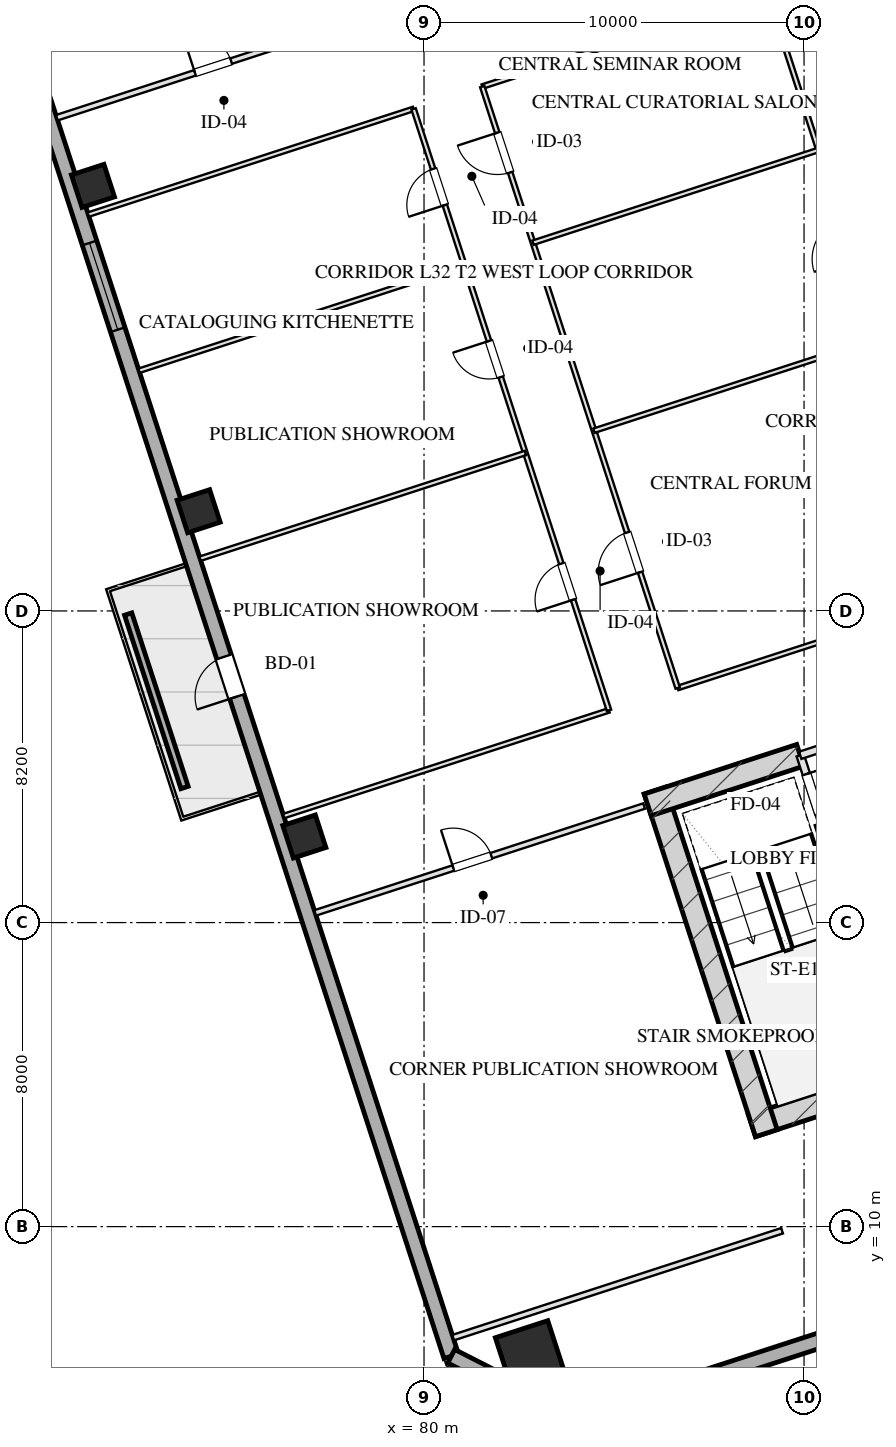
"""IFC4 building model, lengths in metres.
Left out: names, types, materials, properties, quantities, classifications, styles, units other than length and angle.
Written with IfcOpenShell. Run it as: python <this file> out.ifc"""

import sys

from ifc_helpers import new_model, si_unit, direction, frame, frame_2d, origin, origin_2d, place, context, subcontext, project, spatial, rectangle, hollow_rectangle, extrude, element, fill, save


model = new_model("IFC4")
c1 = context("Model", 3, precision=1e-05, world=origin(), true_north=direction((0.0, 1.0)))
c2 = subcontext(c1, "Body", "Model", "MODEL_VIEW")
j1 = project(units=[si_unit("LENGTHUNIT", "METRE"), si_unit("PLANEANGLEUNIT", "RADIAN")], contexts=[c1])
p1 = place(None, origin())
s1 = spatial("IfcSite", under=j1, at=p1, CompositionType="ELEMENT")
p2 = place(p1, origin())
s2 = spatial("IfcBuilding", under=s1, at=p2, CompositionType="ELEMENT")
p3 = place(p2, frame((0.0, 0.0, 124.2)))
s3 = spatial("IfcBuildingStorey", under=s2, at=p3, CompositionType="ELEMENT", Elevation=124.2)
p4 = place(p3, frame((88.63, 12.652, 0.0), z_axis=(0.0, 0.0, 1.0), x_axis=(0.95105714907, 0.309015046886, 0.0)))
e1 = element("IfcWall", 1, at=p4, inside=s3, PredefinedType="SHEAR", context=c2, shape_type="SweptSolid", body=[
    extrude(rectangle(XDim=16.4, YDim=0.6, at=frame_2d((8.2, 0.0))), origin(), (0.0, 0.0, 1.0), 3.45),
])
p5 = place(p3, frame((86.078, 21.475, 0.0), z_axis=(0.0, 0.0, 1.0), x_axis=(0.309017938678, -0.951056209472, 0.0)))
e2 = element("IfcWall", 2, at=p5, inside=s3, PredefinedType="SHEAR", context=c2, shape_type="SweptSolid", body=[
    extrude(rectangle(XDim=9.48, YDim=0.6, at=frame_2d((4.74, 0.0))), origin(), (0.0, 0.0, 1.0), 3.45),
])
p6 = place(p3, frame((85.886, 21.097, 0.0), z_axis=(0.0, 0.0, 1.0), x_axis=(0.951068073652, 0.308981422225, 0.0)))
e3 = element("IfcWall", 3, at=p6, inside=s3, PredefinedType="SHEAR", context=c2, shape_type="SweptSolid", body=[
    extrude(rectangle(XDim=4.22, YDim=0.6, at=frame_2d((2.11, 0.0))), origin(), (0.0, 0.0, 1.0), 3.45),
])
p7 = place(p3, frame((82.791, 6.612, 0.0), z_axis=(0.0, 0.0, 1.0), x_axis=(0.951056516295, 0.309016994375, 0.0)))
e4 = element("IfcColumn", 4, at=p7, inside=s3, PredefinedType="COLUMN", context=c2, shape_type="SweptSolid", body=[
    extrude(hollow_rectangle(XDim=1.45, YDim=1.45, WallThickness=0.05, at=origin_2d()), origin(), (0.0, 0.0, 1.0), 3.451),
])
for number, where, z_axis, x_axis in (
    (5, (76.851, 20.264, 0.0), (0.0, 0.0, 1.0), (0.951, 0.309, 0.0)),
    (6, (74.07, 28.824, 0.0), (0.0, 0.0, 1.0), (0.951, 0.309, 0.0)),
    (7, (71.289, 37.384, 0.0), (0.0, 0.0, 1.0), (0.951, 0.309, 0.0)),
):
    element("IfcColumn", number, at=place(p3, frame(where, z_axis=z_axis, x_axis=x_axis)), inside=s3, PredefinedType="COLUMN", context=c2, shape_type="SweptSolid", body=[
        extrude(hollow_rectangle(XDim=0.9, YDim=0.9, WallThickness=0.032, at=origin_2d()), origin(), (0.0, 0.0, 1.0), 3.451),
    ])
p8 = place(p3, frame((80.716, 6.59, 0.0), z_axis=(0.0, 0.0, 1.0), x_axis=(-0.309017542002, 0.95105633836, 0.0)))
e8 = element("IfcWall", 8, at=p8, inside=s3, PredefinedType="SOLIDWALL", context=c2, shape_type="SweptSolid", body=[
    extrude(rectangle(XDim=46.4, YDim=0.4, at=frame_2d((23.2, 0.0))), origin(), (0.0, 0.0, 1.0), 2.61),
])
p9 = place(p8, frame((28.4, 0.0, 0.75)))
e9 = element("IfcOpeningElement", 9, at=p9, cuts=e8, PredefinedType="OPENING", context=c2, shape_type="SweptSolid", body=[
    extrude(rectangle(XDim=2.4, YDim=1.46, at=frame_2d((1.2, 0.73))), frame((0.0, 0.21, 0.0), z_axis=(0.0, -1.0, 0.0), x_axis=(1.0, 0.0, 0.0)), (0.0, 0.0, 1.0), 0.42),
])
p10 = place(p8, frame((18.25, 0.0, 0.0)))
e10 = element("IfcOpeningElement", 10, at=p10, cuts=e8, PredefinedType="OPENING", context=c2, shape_type="SweptSolid", body=[
    extrude(rectangle(XDim=1.1, YDim=2.15, at=frame_2d((0.55, 1.075))), frame((0.0, 0.21, 0.0), z_axis=(0.0, -1.0, 0.0), x_axis=(1.0, 0.0, 0.0)), (0.0, 0.0, 1.0), 0.42),
])
p11 = place(p3, frame((111.953, 14.005, 0.0), z_axis=(0.0, 0.0, 1.0), x_axis=(-0.95105505922, -0.309021478754, 0.0)))
e11 = element("IfcWall", 11, at=p11, inside=s3, PredefinedType="SOLIDWALL", context=c2, shape_type="SweptSolid", body=[
    extrude(rectangle(XDim=29.4, YDim=0.4, at=frame_2d((14.7, 0.0))), origin(), (0.0, 0.0, 1.0), 2.61),
])
p12 = place(p3, frame((83.992, 4.92, 0.0), z_axis=(0.0, 0.0, 1.0), x_axis=(-0.891001999643, 0.45399937955, 0.0)))
e12 = element("IfcWall", 12, at=p12, inside=s3, PredefinedType="SOLIDWALL", context=c2, shape_type="SweptSolid", body=[
    extrude(rectangle(XDim=3.677, YDim=0.4, at=frame_2d((1.839, 0.0))), origin(), (0.0, 0.0, 1.0), 2.61),
])
p13 = place(p3, frame((73.698, 21.553, 0.0), z_axis=(0.0, 0.0, 1.0), x_axis=(-0.309032019345, 0.951051634255, 0.0)))
e13 = element("IfcWall", 13, at=p13, inside=s3, PredefinedType="PARAPET", context=c2, shape_type="SweptSolid", body=[
    extrude(rectangle(XDim=4.8, YDim=0.2, at=frame_2d((2.4, 0.0))), origin(), (0.0, 0.0, 1.0), 0.75),
])
p14 = place(p3, frame((89.899, 22.401, 0.0), z_axis=(0.0, 0.0, 1.0), x_axis=(0.308932062672, -0.951084108086, 0.0)))
e14 = element("IfcWall", 14, at=p14, inside=s3, PredefinedType="PARTITIONING", context=c2, shape_type="SweptSolid", body=[
    extrude(rectangle(XDim=1.9, YDim=0.2, at=frame_2d((0.95, 0.0))), origin(), (0.0, 0.0, 1.0), 3.175),
])
p15 = place(p14, frame((0.52, 0.0, 0.0)))
e15 = element("IfcOpeningElement", 15, at=p15, cuts=e14, PredefinedType="OPENING", context=c2, shape_type="SweptSolid", body=[
    extrude(rectangle(XDim=1.1, YDim=2.05, at=frame_2d((0.55, 1.025))), frame((0.0, 0.11, 0.0), z_axis=(0.0, -1.0, 0.0), x_axis=(1.0, 0.0, 0.0)), (0.0, 0.0, 1.0), 0.22),
])
p16 = place(p3, frame((89.899, 22.401, 0.0), z_axis=(0.0, 0.0, 1.0), x_axis=(0.951046716504, 0.309047153403, 0.0)))
e16 = element("IfcWall", 16, at=p16, inside=s3, PredefinedType="PARTITIONING", context=c2, shape_type="SweptSolid", body=[
    extrude(rectangle(XDim=3.83, YDim=0.2, at=frame_2d((1.915, 0.0))), origin(), (0.0, 0.0, 1.0), 3.175),
])
p17 = place(p16, frame((1.35, 0.0, 0.0)))
e17 = element("IfcOpeningElement", 17, at=p17, cuts=e16, PredefinedType="OPENING", context=c2, shape_type="SweptSolid", body=[
    extrude(rectangle(XDim=1.2, YDim=2.05, at=frame_2d((0.6, 1.025))), frame((0.0, 0.11, 0.0), z_axis=(0.0, -1.0, 0.0), x_axis=(1.0, 0.0, 0.0)), (0.0, 0.0, 1.0), 0.22),
])
p18 = place(p3, frame((80.767, 7.079, 0.0), z_axis=(0.0, 0.0, 1.0), x_axis=(0.951057133767, 0.309015093986, 0.0)))
e18 = element("IfcWall", 18, at=p18, inside=s3, PredefinedType="PARTITIONING", context=c2, shape_type="SweptSolid", body=[
    extrude(rectangle(XDim=9.1, YDim=0.15, at=frame_2d((4.55, 0.0))), origin(), (0.0, 0.0, 1.0), 3.175),
])
p19 = place(p3, frame((77.136, 18.254, 0.0), z_axis=(0.0, 0.0, 1.0), x_axis=(0.951057133767, 0.309015093986, 0.0)))
e19 = element("IfcWall", 19, at=p19, inside=s3, PredefinedType="PARTITIONING", context=c2, shape_type="SweptSolid", body=[
    extrude(rectangle(XDim=9.1, YDim=0.15, at=frame_2d((4.55, 0.0))), origin(), (0.0, 0.0, 1.0), 3.175),
])
p20 = place(p19, frame((3.822, 0.0, 0.0)))
e20 = element("IfcOpeningElement", 20, at=p20, cuts=e19, PredefinedType="OPENING", context=c2, shape_type="SweptSolid", body=[
    extrude(rectangle(XDim=1.05, YDim=2.05, at=frame_2d((0.525, 1.025))), frame((0.0, 0.085, 0.0), z_axis=(0.0, -1.0, 0.0), x_axis=(1.0, 0.0, 0.0)), (0.0, 0.0, 1.0), 0.17),
])
p21 = place(p3, frame((70.338, 39.177, 0.0), z_axis=(0.0, 0.0, 1.0), x_axis=(0.951059695568, 0.309007209409, 0.0)))
e21 = element("IfcWall", 21, at=p21, inside=s3, PredefinedType="PARTITIONING", context=c2, shape_type="SweptSolid", body=[
    extrude(rectangle(XDim=9.1, YDim=0.15, at=frame_2d((4.55, 0.0))), origin(), (0.0, 0.0, 1.0), 3.175),
])
p22 = place(p21, frame((3.822, 0.0, 0.0)))
e22 = element("IfcOpeningElement", 22, at=p22, cuts=e21, PredefinedType="OPENING", context=c2, shape_type="SweptSolid", body=[
    extrude(rectangle(XDim=1.0, YDim=2.05, at=frame_2d((0.5, 1.025))), frame((0.0, 0.085, 0.0), z_axis=(0.0, -1.0, 0.0), x_axis=(1.0, 0.0, 0.0)), (0.0, 0.0, 1.0), 0.17),
])
p23 = place(p3, frame((76.308, 20.803, 0.0), z_axis=(0.0, 0.0, 1.0), x_axis=(0.951054001411, 0.309024734286, 0.0)))
e23 = element("IfcWall", 23, at=p23, inside=s3, PredefinedType="PARTITIONING", context=c2, shape_type="SweptSolid", body=[
    extrude(rectangle(XDim=9.0, YDim=0.12, at=frame_2d((4.5, 0.0))), origin(), (0.0, 0.0, 1.0), 3.175),
])
p24 = place(p3, frame((86.675, 24.171, 0.0), z_axis=(0.0, 0.0, 1.0), x_axis=(0.951057231385, 0.309014793547, 0.0)))
e24 = element("IfcWall", 24, at=p24, inside=s3, PredefinedType="PARTITIONING", context=c2, shape_type="SweptSolid", body=[
    extrude(rectangle(XDim=7.9, YDim=0.12, at=frame_2d((3.95, 0.0))), origin(), (0.0, 0.0, 1.0), 3.175),
])
p25 = place(p3, frame((71.166, 36.629, 0.0), z_axis=(0.0, 0.0, 1.0), x_axis=(0.951059383421, 0.309008170129, 0.0)))
e25 = element("IfcWall", 25, at=p25, inside=s3, PredefinedType="PARTITIONING", context=c2, shape_type="SweptSolid", body=[
    extrude(rectangle(XDim=9.0, YDim=0.12, at=frame_2d((4.5, 0.0))), origin(), (0.0, 0.0, 1.0), 3.175),
])
p26 = place(p3, frame((81.532, 39.997, 0.0), z_axis=(0.0, 0.0, 1.0), x_axis=(0.951048148493, 0.309042746635, 0.0)))
e26 = element("IfcWall", 26, at=p26, inside=s3, PredefinedType="PARTITIONING", context=c2, shape_type="SweptSolid", body=[
    extrude(rectangle(XDim=7.9, YDim=0.12, at=frame_2d((3.95, 0.0))), origin(), (0.0, 0.0, 1.0), 3.175),
])
p27 = place(p3, frame((84.867, 23.584, 0.0), z_axis=(0.0, 0.0, 1.0), x_axis=(-0.309022042254, 0.951054876125, 0.0)))
e27 = element("IfcWall", 27, at=p27, inside=s3, PredefinedType="PARTITIONING", context=c2, shape_type="SweptSolid", body=[
    extrude(rectangle(XDim=16.64, YDim=0.12, at=frame_2d((8.32, 0.0))), origin(), (0.0, 0.0, 1.0), 3.175),
])
p28 = place(p27, frame((3.06, 0.0, 0.0)))
e28 = element("IfcOpeningElement", 28, at=p28, cuts=e27, PredefinedType="OPENING", context=c2, shape_type="SweptSolid", body=[
    extrude(rectangle(XDim=1.0, YDim=2.05, at=frame_2d((0.5, 1.025))), frame((0.0, 0.07, 0.0), z_axis=(0.0, -1.0, 0.0), x_axis=(1.0, 0.0, 0.0)), (0.0, 0.0, 1.0), 0.14),
])
p29 = place(p27, frame((9.22, 0.0, 0.0)))
e29 = element("IfcOpeningElement", 29, at=p29, cuts=e27, PredefinedType="OPENING", context=c2, shape_type="SweptSolid", body=[
    extrude(rectangle(XDim=1.0, YDim=2.05, at=frame_2d((0.5, 1.025))), frame((0.0, 0.07, 0.0), z_axis=(0.0, -1.0, 0.0), x_axis=(1.0, 0.0, 0.0)), (0.0, 0.0, 1.0), 0.14),
])
p30 = place(p27, frame((13.98, 0.0, 0.0)))
e30 = element("IfcOpeningElement", 30, at=p30, cuts=e27, PredefinedType="OPENING", context=c2, shape_type="SweptSolid", body=[
    extrude(rectangle(XDim=1.0, YDim=2.05, at=frame_2d((0.5, 1.025))), frame((0.0, 0.07, 0.0), z_axis=(0.0, -1.0, 0.0), x_axis=(1.0, 0.0, 0.0)), (0.0, 0.0, 1.0), 0.14),
])
p31 = place(p3, frame((86.675, 24.171, 0.0), z_axis=(0.0, 0.0, 1.0), x_axis=(-0.309022042254, 0.951054876125, 0.0)))
e31 = element("IfcWall", 31, at=p31, inside=s3, PredefinedType="PARTITIONING", context=c2, shape_type="SweptSolid", body=[
    extrude(rectangle(XDim=16.64, YDim=0.12, at=frame_2d((8.32, 0.0))), origin(), (0.0, 0.0, 1.0), 3.175),
])
p32 = place(p31, frame((3.204, 0.0, 0.0)))
e32 = element("IfcOpeningElement", 32, at=p32, cuts=e31, PredefinedType="OPENING", context=c2, shape_type="SweptSolid", body=[
    extrude(rectangle(XDim=1.1, YDim=2.05, at=frame_2d((0.55, 1.025))), frame((0.0, 0.07, 0.0), z_axis=(0.0, -1.0, 0.0), x_axis=(1.0, 0.0, 0.0)), (0.0, 0.0, 1.0), 0.14),
])
p33 = place(p31, frame((14.264, 0.0, 0.0)))
e33 = element("IfcOpeningElement", 33, at=p33, cuts=e31, PredefinedType="OPENING", context=c2, shape_type="SweptSolid", body=[
    extrude(rectangle(XDim=1.1, YDim=2.05, at=frame_2d((0.55, 1.025))), frame((0.0, 0.07, 0.0), z_axis=(0.0, -1.0, 0.0), x_axis=(1.0, 0.0, 0.0)), (0.0, 0.0, 1.0), 0.14),
])
p34 = place(p3, frame((94.188, 26.613, 0.0), z_axis=(0.0, 0.0, 1.0), x_axis=(-0.30901773025, 0.951056277195, 0.0)))
e34 = element("IfcWall", 34, at=p34, inside=s3, PredefinedType="PARTITIONING", context=c2, shape_type="SweptSolid", body=[
    extrude(rectangle(XDim=16.64, YDim=0.12, at=frame_2d((8.32, 0.0))), origin(), (0.0, 0.0, 1.0), 3.175),
])
p35 = place(p34, frame((9.304, 0.0, 0.0)))
e35 = element("IfcOpeningElement", 35, at=p35, cuts=e34, PredefinedType="OPENING", context=c2, shape_type="SweptSolid", body=[
    extrude(rectangle(XDim=1.1, YDim=2.05, at=frame_2d((0.55, 1.025))), frame((0.0, 0.07, 0.0), z_axis=(0.0, -1.0, 0.0), x_axis=(1.0, 0.0, 0.0)), (0.0, 0.0, 1.0), 0.14),
])
for number, where, z_axis, x_axis in (
    (36, (84.474, 30.943, 0.0), (0.0, 0.0, 1.0), (0.951, 0.309, 0.0)),
    (37, (82.867, 35.888, 0.0), (0.0, 0.0, 1.0), (0.951, 0.309, 0.0)),
):
    element("IfcWall", number, at=place(p3, frame(where, z_axis=z_axis, x_axis=x_axis)), inside=s3, PredefinedType="PARTITIONING", context=c2, shape_type="SweptSolid", body=[
        extrude(rectangle(XDim=7.9, YDim=0.12, at=frame_2d((3.95, 0.0))), origin(), (0.0, 0.0, 1.0), 3.175),
    ])
p36 = place(p3, frame((74.108, 27.574, 0.0), z_axis=(0.0, 0.0, 1.0), x_axis=(0.951054001411, 0.309024734286, 0.0)))
e38 = element("IfcWall", 38, at=p36, inside=s3, PredefinedType="PARTITIONING", context=c2, shape_type="SweptSolid", body=[
    extrude(rectangle(XDim=9.0, YDim=0.12, at=frame_2d((4.5, 0.0))), origin(), (0.0, 0.0, 1.0), 3.175),
])
p37 = place(p3, frame((72.501, 32.52, 0.0), z_axis=(0.0, 0.0, 1.0), x_axis=(0.951051410833, 0.309032706929, 0.0)))
e39 = element("IfcWall", 39, at=p37, inside=s3, PredefinedType="PARTITIONING", context=c2, shape_type="SweptSolid", body=[
    extrude(rectangle(XDim=9.0, YDim=0.12, at=frame_2d((4.5, 0.0))), origin(), (0.0, 0.0, 1.0), 3.175),
])
p38 = place(p9, origin())
e40 = element("IfcWindow", 40, at=p38, inside=s3, PartitioningType="TRIPLE_PANEL_VERTICAL", PredefinedType="WINDOW", context=c2, shape_type="SweptSolid", body=[
    extrude(rectangle(XDim=2.4, YDim=1.46, at=frame_2d((1.2, 0.73))), frame((0.0, 0.03, 0.0), z_axis=(0.0, -1.0, 0.0), x_axis=(1.0, 0.0, 0.0)), (0.0, 0.0, 1.0), 0.06),
])
fill(e9, e40)
p39 = place(p10, origin())
e41 = element("IfcDoor", 41, at=p39, inside=s3, OperationType="SINGLE_SWING_LEFT", PredefinedType="DOOR", context=c2, shape_type="SweptSolid", body=[
    extrude(rectangle(XDim=1.1, YDim=2.15, at=frame_2d((0.55, 1.075))), frame((0.0, 0.025, 0.0), z_axis=(0.0, -1.0, 0.0), x_axis=(1.0, 0.0, 0.0)), (0.0, 0.0, 1.0), 0.05),
])
fill(e10, e41)
p40 = place(p15, origin())
e42 = element("IfcDoor", 42, at=p40, inside=s3, OperationType="SINGLE_SWING_LEFT", PredefinedType="DOOR", context=c2, shape_type="SweptSolid", body=[
    extrude(rectangle(XDim=1.1, YDim=2.05, at=frame_2d((0.55, 1.025))), frame((0.0, 0.025, 0.0), z_axis=(0.0, -1.0, 0.0), x_axis=(1.0, 0.0, 0.0)), (0.0, 0.0, 1.0), 0.05),
])
fill(e15, e42)
p41 = place(p20, origin())
e43 = element("IfcDoor", 43, at=p41, inside=s3, OperationType="SINGLE_SWING_LEFT", PredefinedType="DOOR", context=c2, shape_type="SweptSolid", body=[
    extrude(rectangle(XDim=1.05, YDim=2.05, at=frame_2d((0.525, 1.025))), frame((0.0, 0.025, 0.0), z_axis=(0.0, -1.0, 0.0), x_axis=(1.0, 0.0, 0.0)), (0.0, 0.0, 1.0), 0.05),
])
fill(e20, e43)
p42 = place(p22, origin())
e44 = element("IfcDoor", 44, at=p42, inside=s3, OperationType="SINGLE_SWING_LEFT", PredefinedType="DOOR", context=c2, shape_type="SweptSolid", body=[
    extrude(rectangle(XDim=1.0, YDim=2.05, at=frame_2d((0.5, 1.025))), frame((0.0, 0.025, 0.0), z_axis=(0.0, -1.0, 0.0), x_axis=(1.0, 0.0, 0.0)), (0.0, 0.0, 1.0), 0.05),
])
fill(e22, e44)
p43 = place(p28, origin())
e45 = element("IfcDoor", 45, at=p43, inside=s3, OperationType="SINGLE_SWING_LEFT", PredefinedType="DOOR", context=c2, shape_type="SweptSolid", body=[
    extrude(rectangle(XDim=1.0, YDim=2.05, at=frame_2d((0.5, 1.025))), frame((0.0, 0.025, 0.0), z_axis=(0.0, -1.0, 0.0), x_axis=(1.0, 0.0, 0.0)), (0.0, 0.0, 1.0), 0.05),
])
fill(e28, e45)
p44 = place(p29, origin())
e46 = element("IfcDoor", 46, at=p44, inside=s3, OperationType="SINGLE_SWING_RIGHT", PredefinedType="DOOR", context=c2, shape_type="SweptSolid", body=[
    extrude(rectangle(XDim=1.0, YDim=2.05, at=frame_2d((0.5, 1.025))), frame((0.0, 0.025, 0.0), z_axis=(0.0, -1.0, 0.0), x_axis=(1.0, 0.0, 0.0)), (0.0, 0.0, 1.0), 0.05),
])
fill(e29, e46)
p45 = place(p30, origin())
e47 = element("IfcDoor", 47, at=p45, inside=s3, OperationType="SINGLE_SWING_LEFT", PredefinedType="DOOR", context=c2, shape_type="SweptSolid", body=[
    extrude(rectangle(XDim=1.0, YDim=2.05, at=frame_2d((0.5, 1.025))), frame((0.0, 0.025, 0.0), z_axis=(0.0, -1.0, 0.0), x_axis=(1.0, 0.0, 0.0)), (0.0, 0.0, 1.0), 0.05),
])
fill(e30, e47)
p46 = place(p32, origin())
e48 = element("IfcDoor", 48, at=p46, inside=s3, OperationType="SINGLE_SWING_LEFT", PredefinedType="DOOR", context=c2, shape_type="SweptSolid", body=[
    extrude(rectangle(XDim=1.1, YDim=2.05, at=frame_2d((0.55, 1.025))), frame((0.0, 0.025, 0.0), z_axis=(0.0, -1.0, 0.0), x_axis=(1.0, 0.0, 0.0)), (0.0, 0.0, 1.0), 0.05),
])
fill(e32, e48)
p47 = place(p33, origin())
e49 = element("IfcDoor", 49, at=p47, inside=s3, OperationType="SINGLE_SWING_RIGHT", PredefinedType="DOOR", context=c2, shape_type="SweptSolid", body=[
    extrude(rectangle(XDim=1.1, YDim=2.05, at=frame_2d((0.55, 1.025))), frame((0.0, 0.025, 0.0), z_axis=(0.0, -1.0, 0.0), x_axis=(1.0, 0.0, 0.0)), (0.0, 0.0, 1.0), 0.05),
])
fill(e33, e49)
save(model, sys.argv[1])
